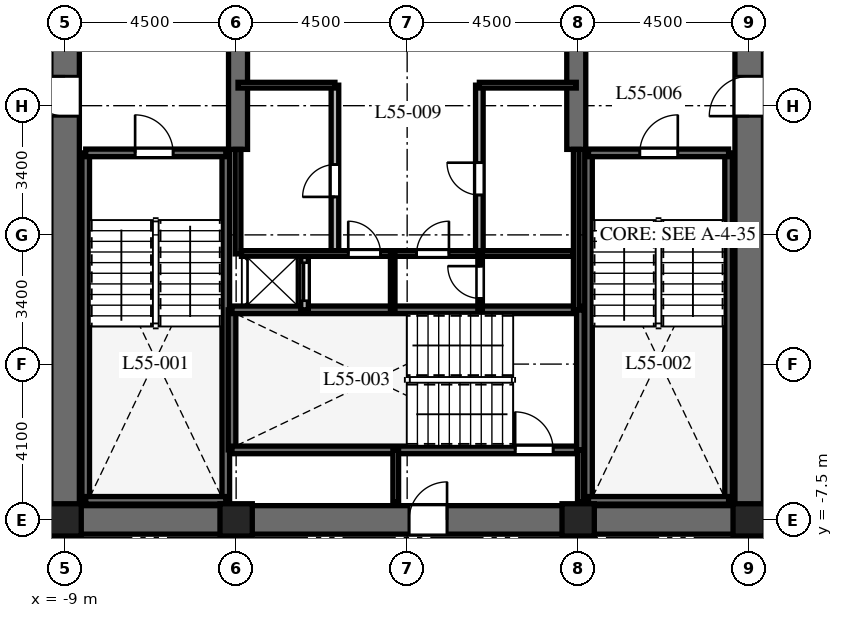
"""IFC4 building model, lengths in metres.
Left out: names, types, materials, properties, quantities, classifications, styles, units other than length and angle.
Written with IfcOpenShell. Run it as: python <this file> out.ifc"""

import sys

from ifc_helpers import new_model, si_unit, direction, frame, frame_2d, origin, origin_2d, place, context, subcontext, project, spatial, rectangle, extrude, element, fill, save


model = new_model("IFC4")
c1 = context("Model", 3, precision=1e-05, world=origin(), true_north=direction((0.0, 1.0)))
c2 = subcontext(c1, "Body", "Model", "MODEL_VIEW")
j1 = project(units=[si_unit("LENGTHUNIT", "METRE"), si_unit("PLANEANGLEUNIT", "RADIAN")], contexts=[c1])
p1 = place(None, origin())
s1 = spatial("IfcSite", under=j1, at=p1, CompositionType="ELEMENT")
p2 = place(p1, origin())
s2 = spatial("IfcBuilding", under=s1, at=p2, CompositionType="ELEMENT")
p3 = place(p2, frame((0.0, 0.0, 221.7)))
s3 = spatial("IfcBuildingStorey", under=s2, at=p3, CompositionType="ELEMENT", Elevation=221.7)
p4 = place(p3, frame((-9.375, -7.5, 0.0), z_axis=(0.0, 0.0, 1.0), x_axis=(1.0, 0.0, 0.0)))
e1 = element("IfcWall", 1, at=p4, inside=s3, PredefinedType="SHEAR", context=c2, shape_type="SweptSolid", body=[
    extrude(rectangle(XDim=18.75, YDim=0.75, at=frame_2d((9.375, 0.0))), origin(), (0.0, 0.0, 1.0), 3.8),
])
p5 = place(p4, frame((9.425, 0.0, 0.0)))
e2 = element("IfcOpeningElement", 2, at=p5, cuts=e1, PredefinedType="OPENING", context=c2, shape_type="SweptSolid", body=[
    extrude(rectangle(XDim=1.0, YDim=2.15, at=frame_2d((0.5, 1.075))), frame((0.0, 0.385, 0.0), z_axis=(0.0, -1.0, 0.0), x_axis=(1.0, 0.0, 0.0)), (0.0, 0.0, 1.0), 0.77),
])
p6 = place(p3, frame((-9.0, -7.125, 0.0), z_axis=(0.0, 0.0, 1.0), x_axis=(0.0, 1.0, 0.0)))
e3 = element("IfcWall", 3, at=p6, inside=s3, PredefinedType="SHEAR", context=c2, shape_type="SweptSolid", body=[
    extrude(rectangle(XDim=14.25, YDim=0.75, at=frame_2d((7.125, 0.0))), origin(), (0.0, 0.0, 1.0), 3.8),
])
p7 = place(p6, frame((10.25, 0.0, 0.0)))
e4 = element("IfcOpeningElement", 4, at=p7, cuts=e3, PredefinedType="OPENING", context=c2, shape_type="SweptSolid", body=[
    extrude(rectangle(XDim=1.05, YDim=2.15, at=frame_2d((0.525, 1.075))), frame((0.0, 0.385, 0.0), z_axis=(0.0, -1.0, 0.0), x_axis=(1.0, 0.0, 0.0)), (0.0, 0.0, 1.0), 0.77),
])
p8 = place(p3, frame((9.0, -7.125, 0.0), z_axis=(0.0, 0.0, 1.0), x_axis=(0.0, 1.0, 0.0)))
e5 = element("IfcWall", 5, at=p8, inside=s3, PredefinedType="SHEAR", context=c2, shape_type="SweptSolid", body=[
    extrude(rectangle(XDim=14.25, YDim=0.75, at=frame_2d((7.125, 0.0))), origin(), (0.0, 0.0, 1.0), 3.8),
])
p9 = place(p8, frame((10.25, 0.0, 0.0)))
e6 = element("IfcOpeningElement", 6, at=p9, cuts=e5, PredefinedType="OPENING", context=c2, shape_type="SweptSolid", body=[
    extrude(rectangle(XDim=1.05, YDim=2.15, at=frame_2d((0.525, 1.075))), frame((0.0, 0.385, 0.0), z_axis=(0.0, -1.0, 0.0), x_axis=(1.0, 0.0, 0.0)), (0.0, 0.0, 1.0), 0.77),
])
for number, where, z_axis, x_axis in (
    (7, (-4.45, 2.25, 0.0), (0.0, 0.0, 1.0), (0.0, 1.0, 0.0)),
    (8, (4.45, 2.25, 0.0), (0.0, 0.0, 1.0), (0.0, 1.0, 0.0)),
):
    element("IfcWall", number, at=place(p3, frame(where, z_axis=z_axis, x_axis=x_axis)), inside=s3, PredefinedType="SHEAR", context=c2, shape_type="SweptSolid", body=[
        extrude(rectangle(XDim=4.875, YDim=0.5, at=frame_2d((2.438, 0.0))), origin(), (0.0, 0.0, 1.0), 3.8),
    ])
for number, where, z_axis, x_axis in (
    (9, (-8.458, -6.985, 0.0), (0.0, 0.0, 1.0), (0.0, 1.0, 0.0)),
    (10, (-4.772, -6.985, 0.0), (0.0, 0.0, 1.0), (0.0, 1.0, 0.0)),
):
    element("IfcWall", number, at=place(p3, frame(where, z_axis=z_axis, x_axis=x_axis)), inside=s3, PredefinedType="SHEAR", context=c2, shape_type="SweptSolid", body=[
        extrude(rectangle(XDim=9.143, YDim=0.2, at=frame_2d((4.572, 0.0))), origin(), (0.0, 0.0, 1.0), 3.8),
    ])
p10 = place(p3, frame((-8.458, -6.985, 0.0), z_axis=(0.0, 0.0, 1.0), x_axis=(1.0, 0.0, 0.0)))
e11 = element("IfcWall", 11, at=p10, inside=s3, PredefinedType="SHEAR", context=c2, shape_type="SweptSolid", body=[
    extrude(rectangle(XDim=3.686, YDim=0.2, at=frame_2d((1.843, 0.0))), origin(), (0.0, 0.0, 1.0), 3.8),
])
p11 = place(p3, frame((-8.458, 2.158, 0.0), z_axis=(0.0, 0.0, 1.0), x_axis=(1.0, 0.0, 0.0)))
e12 = element("IfcWall", 12, at=p11, inside=s3, PredefinedType="SHEAR", context=c2, shape_type="SweptSolid", body=[
    extrude(rectangle(XDim=3.686, YDim=0.2, at=frame_2d((1.843, 0.0))), origin(), (0.0, 0.0, 1.0), 3.8),
])
p12 = place(p11, frame((1.3, 0.0, 0.0)))
e13 = element("IfcOpeningElement", 13, at=p12, cuts=e12, PredefinedType="OPENING", context=c2, shape_type="SweptSolid", body=[
    extrude(rectangle(XDim=1.0, YDim=2.15, at=frame_2d((0.5, 1.075))), frame((0.0, 0.11, 0.0), z_axis=(0.0, -1.0, 0.0), x_axis=(1.0, 0.0, 0.0)), (0.0, 0.0, 1.0), 0.22),
])
for number, where, z_axis, x_axis in (
    (14, (4.772, -6.985, 0.0), (0.0, 0.0, 1.0), (0.0, 1.0, 0.0)),
    (15, (8.458, -6.985, 0.0), (0.0, 0.0, 1.0), (0.0, 1.0, 0.0)),
):
    element("IfcWall", number, at=place(p3, frame(where, z_axis=z_axis, x_axis=x_axis)), inside=s3, PredefinedType="SHEAR", context=c2, shape_type="SweptSolid", body=[
        extrude(rectangle(XDim=9.143, YDim=0.2, at=frame_2d((4.572, 0.0))), origin(), (0.0, 0.0, 1.0), 3.8),
    ])
p13 = place(p3, frame((4.772, -6.985, 0.0), z_axis=(0.0, 0.0, 1.0), x_axis=(1.0, 0.0, 0.0)))
e16 = element("IfcWall", 16, at=p13, inside=s3, PredefinedType="SHEAR", context=c2, shape_type="SweptSolid", body=[
    extrude(rectangle(XDim=3.686, YDim=0.2, at=frame_2d((1.843, 0.0))), origin(), (0.0, 0.0, 1.0), 3.8),
])
p14 = place(p3, frame((4.772, 2.158, 0.0), z_axis=(0.0, 0.0, 1.0), x_axis=(1.0, 0.0, 0.0)))
e17 = element("IfcWall", 17, at=p14, inside=s3, PredefinedType="SHEAR", context=c2, shape_type="SweptSolid", body=[
    extrude(rectangle(XDim=3.686, YDim=0.2, at=frame_2d((1.843, 0.0))), origin(), (0.0, 0.0, 1.0), 3.8),
])
p15 = place(p14, frame((1.35, 0.0, 0.0)))
e18 = element("IfcOpeningElement", 18, at=p15, cuts=e17, PredefinedType="OPENING", context=c2, shape_type="SweptSolid", body=[
    extrude(rectangle(XDim=1.0, YDim=2.15, at=frame_2d((0.5, 1.075))), frame((0.0, 0.11, 0.0), z_axis=(0.0, -1.0, 0.0), x_axis=(1.0, 0.0, 0.0)), (0.0, 0.0, 1.0), 0.22),
])
p16 = place(p3, frame((-4.608, -5.658, 0.0), z_axis=(0.0, 0.0, 1.0), x_axis=(0.0, 1.0, 0.0)))
e19 = element("IfcWall", 19, at=p16, inside=s3, PredefinedType="SHEAR", context=c2, shape_type="SweptSolid", body=[
    extrude(rectangle(XDim=3.686, YDim=0.2, at=frame_2d((1.843, 0.0))), origin(), (0.0, 0.0, 1.0), 3.8),
])
p17 = place(p3, frame((-4.608, -5.658, 0.0), z_axis=(0.0, 0.0, 1.0), x_axis=(1.0, 0.0, 0.0)))
e20 = element("IfcWall", 20, at=p17, inside=s3, PredefinedType="SHEAR", context=c2, shape_type="SweptSolid", body=[
    extrude(rectangle(XDim=9.166, YDim=0.2, at=frame_2d((4.583, 0.0))), origin(), (0.0, 0.0, 1.0), 3.8),
])
p18 = place(p17, frame((7.45, 0.0, 0.0)))
e21 = element("IfcOpeningElement", 21, at=p18, cuts=e20, PredefinedType="OPENING", context=c2, shape_type="SweptSolid", body=[
    extrude(rectangle(XDim=1.0, YDim=2.15, at=frame_2d((0.5, 1.075))), frame((0.0, 0.11, 0.0), z_axis=(0.0, -1.0, 0.0), x_axis=(1.0, 0.0, 0.0)), (0.0, 0.0, 1.0), 0.22),
])
p19 = place(p3, frame((-4.608, -1.972, 0.0), z_axis=(0.0, 0.0, 1.0), x_axis=(1.0, 0.0, 0.0)))
e22 = element("IfcWall", 22, at=p19, inside=s3, PredefinedType="SHEAR", context=c2, shape_type="SweptSolid", body=[
    extrude(rectangle(XDim=9.166, YDim=0.2, at=frame_2d((4.583, 0.0))), origin(), (0.0, 0.0, 1.0), 3.8),
])
p20 = place(p3, frame((4.558, -5.658, 0.0), z_axis=(0.0, 0.0, 1.0), x_axis=(0.0, 1.0, 0.0)))
e23 = element("IfcWall", 23, at=p20, inside=s3, PredefinedType="SHEAR", context=c2, shape_type="SweptSolid", body=[
    extrude(rectangle(XDim=3.686, YDim=0.2, at=frame_2d((1.843, 0.0))), origin(), (0.0, 0.0, 1.0), 3.8),
])
for number, where, z_axis, x_axis in (
    (24, (-9.0, -7.5, 0.0), (0.0, 0.0, 1.0), (1.0, 0.0, 0.0)),
    (25, (-4.5, -7.5, 0.0), (0.0, 0.0, 1.0), (1.0, 0.0, 0.0)),
    (26, (4.5, -7.5, 0.0), (0.0, 0.0, 1.0), (1.0, 0.0, 0.0)),
    (27, (9.0, -7.5, 0.0), (0.0, 0.0, 1.0), (1.0, 0.0, 0.0)),
):
    element("IfcColumn", number, at=place(p3, frame(where, z_axis=z_axis, x_axis=x_axis)), inside=s3, PredefinedType="COLUMN", context=c2, shape_type="SweptSolid", body=[
        extrude(rectangle(XDim=0.85, YDim=0.85, at=origin_2d()), origin(), (0.0, 0.0, 1.0), 3.8),
    ])
for number, where, z_axis, x_axis in (
    (28, (-0.3, -7.02, 0.0), (0.0, 0.0, 1.0), (0.0, 1.0, 0.0)),
    (29, (4.558, -7.02, 0.0), (0.0, 0.0, 1.0), (0.0, 1.0, 0.0)),
):
    element("IfcWall", number, at=place(p3, frame(where, z_axis=z_axis, x_axis=x_axis)), inside=s3, PredefinedType="PARTITIONING", context=c2, shape_type="SweptSolid", body=[
        extrude(rectangle(XDim=1.362, YDim=0.15, at=frame_2d((0.681, 0.0))), origin(), (0.0, 0.0, 1.0), 3.5),
    ])
p21 = place(p3, frame((-2.7, -1.972, 0.0), z_axis=(0.0, 0.0, 1.0), x_axis=(0.0, 1.0, 0.0)))
e30 = element("IfcWall", 30, at=p21, inside=s3, PredefinedType="PARTITIONING", context=c2, shape_type="SweptSolid", body=[
    extrude(rectangle(XDim=1.472, YDim=0.2, at=frame_2d((0.736, 0.0))), origin(), (0.0, 0.0, 1.0), 3.5),
])
p22 = place(p21, frame((0.24, 0.0, 0.0)))
e31 = element("IfcOpeningElement", 31, at=p22, cuts=e30, PredefinedType="OPENING", context=c2, shape_type="SweptSolid", body=[
    extrude(rectangle(XDim=1.0, YDim=2.2, at=frame_2d((0.5, 1.1))), frame((0.0, 0.11, 0.0), z_axis=(0.0, -1.0, 0.0), x_axis=(1.0, 0.0, 0.0)), (0.0, 0.0, 1.0), 0.22),
])
p23 = place(p3, frame((-4.45, -0.5, 0.0), z_axis=(0.0, 0.0, 1.0), x_axis=(0.0, 1.0, 0.0)))
e32 = element("IfcWall", 32, at=p23, inside=s3, PredefinedType="PARTITIONING", context=c2, shape_type="SweptSolid", body=[
    extrude(rectangle(XDim=2.75, YDim=0.15, at=frame_2d((1.375, 0.0))), origin(), (0.0, 0.0, 1.0), 3.5),
])
p24 = place(p3, frame((4.45, -1.972, 0.0), z_axis=(0.0, 0.0, 1.0), x_axis=(0.0, 1.0, 0.0)))
e33 = element("IfcWall", 33, at=p24, inside=s3, PredefinedType="PARTITIONING", context=c2, shape_type="SweptSolid", body=[
    extrude(rectangle(XDim=4.222, YDim=0.15, at=frame_2d((2.111, 0.0))), origin(), (0.0, 0.0, 1.0), 3.5),
])
p25 = place(p3, frame((-1.9, -0.5, 0.0), z_axis=(0.0, 0.0, 1.0), x_axis=(0.0, 1.0, 0.0)))
e34 = element("IfcWall", 34, at=p25, inside=s3, PredefinedType="PARTITIONING", context=c2, shape_type="SweptSolid", body=[
    extrude(rectangle(XDim=4.44, YDim=0.2, at=frame_2d((2.22, 0.0))), origin(), (0.0, 0.0, 1.0), 3.5),
])
p26 = place(p25, frame((1.5, 0.0, 0.0)))
e35 = element("IfcOpeningElement", 35, at=p26, cuts=e34, PredefinedType="OPENING", context=c2, shape_type="SweptSolid", body=[
    extrude(rectangle(XDim=0.85, YDim=2.03, at=frame_2d((0.425, 1.015))), frame((0.0, 0.11, 0.0), z_axis=(0.0, -1.0, 0.0), x_axis=(1.0, 0.0, 0.0)), (0.0, 0.0, 1.0), 0.22),
])
p27 = place(p3, frame((-4.45, 3.94, 0.0), z_axis=(0.0, 0.0, 1.0), x_axis=(1.0, 0.0, 0.0)))
e36 = element("IfcWall", 36, at=p27, inside=s3, PredefinedType="PARTITIONING", context=c2, shape_type="SweptSolid", body=[
    extrude(rectangle(XDim=2.55, YDim=0.15, at=frame_2d((1.275, 0.0))), origin(), (0.0, 0.0, 1.0), 3.5),
])
p28 = place(p3, frame((1.9, -0.5, 0.0), z_axis=(0.0, 0.0, 1.0), x_axis=(0.0, 1.0, 0.0)))
e37 = element("IfcWall", 37, at=p28, inside=s3, PredefinedType="PARTITIONING", context=c2, shape_type="SweptSolid", body=[
    extrude(rectangle(XDim=4.44, YDim=0.2, at=frame_2d((2.22, 0.0))), origin(), (0.0, 0.0, 1.0), 3.5),
])
p29 = place(p28, frame((1.55, 0.0, 0.0)))
e38 = element("IfcOpeningElement", 38, at=p29, cuts=e37, PredefinedType="OPENING", context=c2, shape_type="SweptSolid", body=[
    extrude(rectangle(XDim=0.85, YDim=2.03, at=frame_2d((0.425, 1.015))), frame((0.0, 0.11, 0.0), z_axis=(0.0, -1.0, 0.0), x_axis=(1.0, 0.0, 0.0)), (0.0, 0.0, 1.0), 0.22),
])
p30 = place(p3, frame((1.9, 3.94, 0.0), z_axis=(0.0, 0.0, 1.0), x_axis=(1.0, 0.0, 0.0)))
e39 = element("IfcWall", 39, at=p30, inside=s3, PredefinedType="PARTITIONING", context=c2, shape_type="SweptSolid", body=[
    extrude(rectangle(XDim=2.55, YDim=0.15, at=frame_2d((1.275, 0.0))), origin(), (0.0, 0.0, 1.0), 3.5),
])
p31 = place(p3, frame((-4.36, -0.49, 0.0), z_axis=(0.0, 0.0, 1.0), x_axis=(1.0, 0.0, 0.0)))
e40 = element("IfcWall", 40, at=p31, inside=s3, PredefinedType="PARTITIONING", context=c2, shape_type="SweptSolid", body=[
    extrude(rectangle(XDim=8.72, YDim=0.15, at=frame_2d((4.36, 0.0))), origin(), (0.0, 0.0, 1.0), 3.5),
])
p32 = place(p31, frame((2.81, 0.0, 0.0)))
e41 = element("IfcOpeningElement", 41, at=p32, cuts=e40, PredefinedType="OPENING", context=c2, shape_type="SweptSolid", body=[
    extrude(rectangle(XDim=0.85, YDim=2.03, at=frame_2d((0.425, 1.015))), frame((0.0, 0.085, 0.0), z_axis=(0.0, -1.0, 0.0), x_axis=(1.0, 0.0, 0.0)), (0.0, 0.0, 1.0), 0.17),
])
p33 = place(p31, frame((4.61, 0.0, 0.0)))
e42 = element("IfcOpeningElement", 42, at=p33, cuts=e40, PredefinedType="OPENING", context=c2, shape_type="SweptSolid", body=[
    extrude(rectangle(XDim=0.85, YDim=2.03, at=frame_2d((0.425, 1.015))), frame((0.0, 0.085, 0.0), z_axis=(0.0, -1.0, 0.0), x_axis=(1.0, 0.0, 0.0)), (0.0, 0.0, 1.0), 0.17),
])
p34 = place(p3, frame((-0.38, -1.972, 0.0), z_axis=(0.0, 0.0, 1.0), x_axis=(0.0, 1.0, 0.0)))
e43 = element("IfcWall", 43, at=p34, inside=s3, PredefinedType="PARTITIONING", context=c2, shape_type="SweptSolid", body=[
    extrude(rectangle(XDim=1.472, YDim=0.12, at=frame_2d((0.736, 0.0))), origin(), (0.0, 0.0, 1.0), 3.5),
])
p35 = place(p3, frame((1.92, -1.972, 0.0), z_axis=(0.0, 0.0, 1.0), x_axis=(0.0, 1.0, 0.0)))
e44 = element("IfcWall", 44, at=p35, inside=s3, PredefinedType="PARTITIONING", context=c2, shape_type="SweptSolid", body=[
    extrude(rectangle(XDim=1.472, YDim=0.12, at=frame_2d((0.736, 0.0))), origin(), (0.0, 0.0, 1.0), 3.5),
])
p36 = place(p35, frame((0.3, 0.0, 0.0)))
e45 = element("IfcOpeningElement", 45, at=p36, cuts=e44, PredefinedType="OPENING", context=c2, shape_type="SweptSolid", body=[
    extrude(rectangle(XDim=0.85, YDim=2.03, at=frame_2d((0.425, 1.015))), frame((0.0, 0.07, 0.0), z_axis=(0.0, -1.0, 0.0), x_axis=(1.0, 0.0, 0.0)), (0.0, 0.0, 1.0), 0.14),
])
p37 = place(p12, origin())
e46 = element("IfcDoor", 46, at=p37, inside=s3, OperationType="SINGLE_SWING_LEFT", PredefinedType="DOOR", context=c2, shape_type="SweptSolid", body=[
    extrude(rectangle(XDim=1.0, YDim=2.15, at=frame_2d((0.5, 1.075))), frame((0.0, 0.025, 0.0), z_axis=(0.0, -1.0, 0.0), x_axis=(1.0, 0.0, 0.0)), (0.0, 0.0, 1.0), 0.05),
])
fill(e13, e46)
p38 = place(p15, origin())
e47 = element("IfcDoor", 47, at=p38, inside=s3, OperationType="SINGLE_SWING_RIGHT", PredefinedType="DOOR", context=c2, shape_type="SweptSolid", body=[
    extrude(rectangle(XDim=1.0, YDim=2.15, at=frame_2d((0.5, 1.075))), frame((0.0, 0.025, 0.0), z_axis=(0.0, -1.0, 0.0), x_axis=(1.0, 0.0, 0.0)), (0.0, 0.0, 1.0), 0.05),
])
fill(e18, e47)
p39 = place(p18, origin())
e48 = element("IfcDoor", 48, at=p39, inside=s3, OperationType="SINGLE_SWING_LEFT", PredefinedType="DOOR", context=c2, shape_type="SweptSolid", body=[
    extrude(rectangle(XDim=1.0, YDim=2.15, at=frame_2d((0.5, 1.075))), frame((0.0, 0.025, 0.0), z_axis=(0.0, -1.0, 0.0), x_axis=(1.0, 0.0, 0.0)), (0.0, 0.0, 1.0), 0.05),
])
fill(e21, e48)
p40 = place(p5, origin())
e49 = element("IfcDoor", 49, at=p40, inside=s3, OperationType="SINGLE_SWING_RIGHT", PredefinedType="DOOR", context=c2, shape_type="SweptSolid", body=[
    extrude(rectangle(XDim=1.0, YDim=2.15, at=frame_2d((0.5, 1.075))), frame((0.0, 0.025, 0.0), z_axis=(0.0, -1.0, 0.0), x_axis=(1.0, 0.0, 0.0)), (0.0, 0.0, 1.0), 0.05),
])
fill(e2, e49)
p41 = place(p7, origin())
e50 = element("IfcDoor", 50, at=p41, inside=s3, OperationType="SINGLE_SWING_RIGHT", PredefinedType="DOOR", context=c2, shape_type="SweptSolid", body=[
    extrude(rectangle(XDim=1.05, YDim=2.15, at=frame_2d((0.525, 1.075))), frame((0.0, 0.025, 0.0), z_axis=(0.0, -1.0, 0.0), x_axis=(1.0, 0.0, 0.0)), (0.0, 0.0, 1.0), 0.05),
])
fill(e4, e50)
p42 = place(p9, origin())
e51 = element("IfcDoor", 51, at=p42, inside=s3, OperationType="SINGLE_SWING_LEFT", PredefinedType="DOOR", context=c2, shape_type="SweptSolid", body=[
    extrude(rectangle(XDim=1.05, YDim=2.15, at=frame_2d((0.525, 1.075))), frame((0.0, 0.025, 0.0), z_axis=(0.0, -1.0, 0.0), x_axis=(1.0, 0.0, 0.0)), (0.0, 0.0, 1.0), 0.05),
])
fill(e6, e51)
p43 = place(p22, origin())
e52 = element("IfcDoor", 52, at=p43, inside=s3, OperationType="SLIDING_TO_LEFT", PredefinedType="DOOR", context=c2, shape_type="SweptSolid", body=[
    extrude(rectangle(XDim=1.0, YDim=2.2, at=frame_2d((0.5, 1.1))), frame((0.0, 0.025, 0.0), z_axis=(0.0, -1.0, 0.0), x_axis=(1.0, 0.0, 0.0)), (0.0, 0.0, 1.0), 0.05),
])
fill(e31, e52)
p44 = place(p26, origin())
e53 = element("IfcDoor", 53, at=p44, inside=s3, OperationType="SINGLE_SWING_LEFT", PredefinedType="DOOR", context=c2, shape_type="SweptSolid", body=[
    extrude(rectangle(XDim=0.85, YDim=2.03, at=frame_2d((0.425, 1.015))), frame((0.0, 0.025, 0.0), z_axis=(0.0, -1.0, 0.0), x_axis=(1.0, 0.0, 0.0)), (0.0, 0.0, 1.0), 0.05),
])
fill(e35, e53)
p45 = place(p29, origin())
e54 = element("IfcDoor", 54, at=p45, inside=s3, OperationType="SINGLE_SWING_RIGHT", PredefinedType="DOOR", context=c2, shape_type="SweptSolid", body=[
    extrude(rectangle(XDim=0.85, YDim=2.03, at=frame_2d((0.425, 1.015))), frame((0.0, 0.025, 0.0), z_axis=(0.0, -1.0, 0.0), x_axis=(1.0, 0.0, 0.0)), (0.0, 0.0, 1.0), 0.05),
])
fill(e38, e54)
p46 = place(p32, origin())
e55 = element("IfcDoor", 55, at=p46, inside=s3, OperationType="SINGLE_SWING_LEFT", PredefinedType="DOOR", context=c2, shape_type="SweptSolid", body=[
    extrude(rectangle(XDim=0.85, YDim=2.03, at=frame_2d((0.425, 1.015))), frame((0.0, 0.025, 0.0), z_axis=(0.0, -1.0, 0.0), x_axis=(1.0, 0.0, 0.0)), (0.0, 0.0, 1.0), 0.05),
])
fill(e41, e55)
p47 = place(p33, origin())
e56 = element("IfcDoor", 56, at=p47, inside=s3, OperationType="SINGLE_SWING_RIGHT", PredefinedType="DOOR", context=c2, shape_type="SweptSolid", body=[
    extrude(rectangle(XDim=0.85, YDim=2.03, at=frame_2d((0.425, 1.015))), frame((0.0, 0.025, 0.0), z_axis=(0.0, -1.0, 0.0), x_axis=(1.0, 0.0, 0.0)), (0.0, 0.0, 1.0), 0.05),
])
fill(e42, e56)
p48 = place(p36, origin())
e57 = element("IfcDoor", 57, at=p48, inside=s3, OperationType="SINGLE_SWING_RIGHT", PredefinedType="DOOR", context=c2, shape_type="SweptSolid", body=[
    extrude(rectangle(XDim=0.85, YDim=2.03, at=frame_2d((0.425, 1.015))), frame((0.0, 0.025, 0.0), z_axis=(0.0, -1.0, 0.0), x_axis=(1.0, 0.0, 0.0)), (0.0, 0.0, 1.0), 0.05),
])
fill(e45, e57)
save(model, sys.argv[1])
